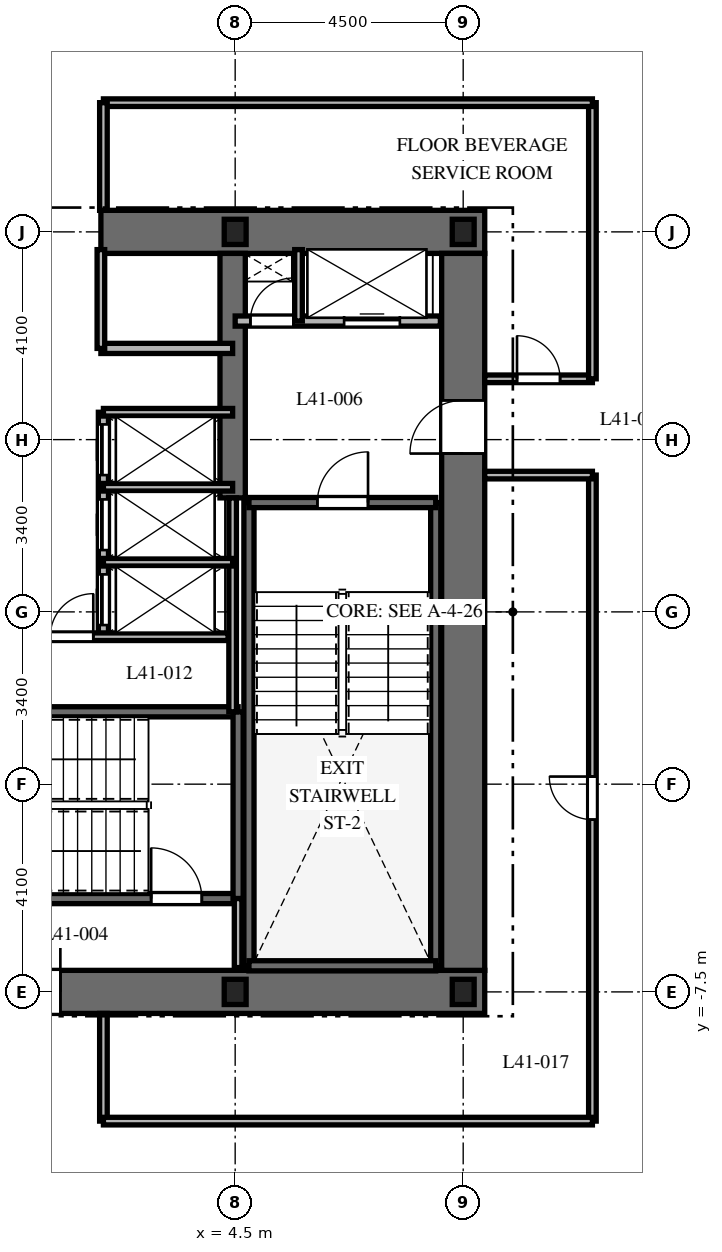
"""IFC4 building model, lengths in metres.
Left out: names, types, materials, properties, quantities, classifications, styles, units other than length and angle.
Written with IfcOpenShell. Run it as: python <this file> out.ifc"""

import sys

from ifc_helpers import new_model, si_unit, direction, frame, frame_2d, origin, origin_2d, place, context, subcontext, project, spatial, rectangle, i_section, extrude, element, fill, save


model = new_model("IFC4")
c1 = context("Model", 3, precision=1e-05, world=origin(), true_north=direction((0.0, 1.0)))
c2 = subcontext(c1, "Body", "Model", "MODEL_VIEW")
j1 = project(units=[si_unit("LENGTHUNIT", "METRE"), si_unit("PLANEANGLEUNIT", "RADIAN")], contexts=[c1])
p1 = place(None, origin())
s1 = spatial("IfcSite", under=j1, at=p1, CompositionType="ELEMENT")
p2 = place(p1, origin())
s2 = spatial("IfcBuilding", under=s1, at=p2, CompositionType="ELEMENT")
p3 = place(p2, frame((0.0, 0.0, 166.5)))
s3 = spatial("IfcBuildingStorey", under=s2, at=p3, CompositionType="ELEMENT", Elevation=166.5)
p4 = place(p3, frame((-9.425, -7.5, 0.0), z_axis=(0.0, 0.0, 1.0), x_axis=(1.0, 0.0, 0.0)))
e1 = element("IfcWall", 1, at=p4, inside=s3, PredefinedType="SHEAR", context=c2, shape_type="SweptSolid", body=[
    extrude(rectangle(XDim=18.85, YDim=0.85, at=frame_2d((9.425, 0.0))), origin(), (0.0, 0.0, 1.0), 3.7),
])
p5 = place(p4, frame((9.475, 0.0, 0.0)))
e2 = element("IfcOpeningElement", 2, at=p5, cuts=e1, PredefinedType="OPENING", context=c2, shape_type="SweptSolid", body=[
    extrude(rectangle(XDim=1.0, YDim=2.15, at=frame_2d((0.5, 1.075))), frame((0.0, 0.435, 0.0), z_axis=(0.0, -1.0, 0.0), x_axis=(1.0, 0.0, 0.0)), (0.0, 0.0, 1.0), 0.87),
])
p6 = place(p3, frame((1.85, 7.5, 0.0), z_axis=(0.0, 0.0, 1.0), x_axis=(1.0, 0.0, 0.0)))
e3 = element("IfcWall", 3, at=p6, inside=s3, PredefinedType="SHEAR", context=c2, shape_type="SweptSolid", body=[
    extrude(rectangle(XDim=7.575, YDim=0.85, at=frame_2d((3.788, 0.0))), origin(), (0.0, 0.0, 1.0), 3.7),
])
p7 = place(p3, frame((9.0, -7.075, 0.0), z_axis=(0.0, 0.0, 1.0), x_axis=(0.0, 1.0, 0.0)))
e4 = element("IfcWall", 4, at=p7, inside=s3, PredefinedType="SHEAR", context=c2, shape_type="SweptSolid", body=[
    extrude(rectangle(XDim=14.15, YDim=0.85, at=frame_2d((7.075, 0.0))), origin(), (0.0, 0.0, 1.0), 3.7),
])
p8 = place(p7, frame((10.2, 0.0, 0.0)))
e5 = element("IfcOpeningElement", 5, at=p8, cuts=e4, PredefinedType="OPENING", context=c2, shape_type="SweptSolid", body=[
    extrude(rectangle(XDim=1.05, YDim=2.15, at=frame_2d((0.525, 1.075))), frame((0.0, 0.435, 0.0), z_axis=(0.0, -1.0, 0.0), x_axis=(1.0, 0.0, 0.0)), (0.0, 0.0, 1.0), 0.87),
])
p9 = place(p3, frame((4.45, 2.25, 0.0), z_axis=(0.0, 0.0, 1.0), x_axis=(0.0, 1.0, 0.0)))
e6 = element("IfcWall", 6, at=p9, inside=s3, PredefinedType="SHEAR", context=c2, shape_type="SweptSolid", body=[
    extrude(rectangle(XDim=4.825, YDim=0.5, at=frame_2d((2.413, 0.0))), origin(), (0.0, 0.0, 1.0), 3.7),
])
for number, where, z_axis, x_axis in (
    (7, (4.772, -6.985, 0.0), (0.0, 0.0, 1.0), (0.0, 1.0, 0.0)),
    (8, (8.458, -6.985, 0.0), (0.0, 0.0, 1.0), (0.0, 1.0, 0.0)),
):
    element("IfcWall", number, at=place(p3, frame(where, z_axis=z_axis, x_axis=x_axis)), inside=s3, PredefinedType="SHEAR", context=c2, shape_type="SweptSolid", body=[
        extrude(rectangle(XDim=9.143, YDim=0.2, at=frame_2d((4.572, 0.0))), origin(), (0.0, 0.0, 1.0), 3.7),
    ])
p10 = place(p3, frame((4.772, -6.985, 0.0), z_axis=(0.0, 0.0, 1.0), x_axis=(1.0, 0.0, 0.0)))
e9 = element("IfcWall", 9, at=p10, inside=s3, PredefinedType="SHEAR", context=c2, shape_type="SweptSolid", body=[
    extrude(rectangle(XDim=3.686, YDim=0.2, at=frame_2d((1.843, 0.0))), origin(), (0.0, 0.0, 1.0), 3.7),
])
p11 = place(p3, frame((4.772, 2.158, 0.0), z_axis=(0.0, 0.0, 1.0), x_axis=(1.0, 0.0, 0.0)))
e10 = element("IfcWall", 10, at=p11, inside=s3, PredefinedType="SHEAR", context=c2, shape_type="SweptSolid", body=[
    extrude(rectangle(XDim=3.686, YDim=0.2, at=frame_2d((1.843, 0.0))), origin(), (0.0, 0.0, 1.0), 3.7),
])
p12 = place(p11, frame((1.35, 0.0, 0.0)))
e11 = element("IfcOpeningElement", 11, at=p12, cuts=e10, PredefinedType="OPENING", context=c2, shape_type="SweptSolid", body=[
    extrude(rectangle(XDim=1.0, YDim=2.15, at=frame_2d((0.5, 1.075))), frame((0.0, 0.11, 0.0), z_axis=(0.0, -1.0, 0.0), x_axis=(1.0, 0.0, 0.0)), (0.0, 0.0, 1.0), 0.22),
])
p13 = place(p3, frame((-4.608, -5.658, 0.0), z_axis=(0.0, 0.0, 1.0), x_axis=(1.0, 0.0, 0.0)))
e12 = element("IfcWall", 12, at=p13, inside=s3, PredefinedType="SHEAR", context=c2, shape_type="SweptSolid", body=[
    extrude(rectangle(XDim=9.166, YDim=0.2, at=frame_2d((4.583, 0.0))), origin(), (0.0, 0.0, 1.0), 3.7),
])
p14 = place(p13, frame((7.45, 0.0, 0.0)))
e13 = element("IfcOpeningElement", 13, at=p14, cuts=e12, PredefinedType="OPENING", context=c2, shape_type="SweptSolid", body=[
    extrude(rectangle(XDim=1.0, YDim=2.15, at=frame_2d((0.5, 1.075))), frame((0.0, 0.11, 0.0), z_axis=(0.0, -1.0, 0.0), x_axis=(1.0, 0.0, 0.0)), (0.0, 0.0, 1.0), 0.22),
])
p15 = place(p3, frame((-4.608, -1.972, 0.0), z_axis=(0.0, 0.0, 1.0), x_axis=(1.0, 0.0, 0.0)))
e14 = element("IfcWall", 14, at=p15, inside=s3, PredefinedType="SHEAR", context=c2, shape_type="SweptSolid", body=[
    extrude(rectangle(XDim=9.166, YDim=0.2, at=frame_2d((4.583, 0.0))), origin(), (0.0, 0.0, 1.0), 3.7),
])
p16 = place(p3, frame((4.558, -5.658, 0.0), z_axis=(0.0, 0.0, 1.0), x_axis=(0.0, 1.0, 0.0)))
e15 = element("IfcWall", 15, at=p16, inside=s3, PredefinedType="SHEAR", context=c2, shape_type="SweptSolid", body=[
    extrude(rectangle(XDim=3.686, YDim=0.2, at=frame_2d((1.843, 0.0))), origin(), (0.0, 0.0, 1.0), 3.7),
])
for number, where, z_axis, x_axis in (
    (16, (4.5, -7.5, 0.0), (0.0, 0.0, 1.0), (1.0, 0.0, 0.0)),
    (17, (9.0, -7.5, 0.0), (0.0, 0.0, 1.0), (1.0, 0.0, 0.0)),
    (18, (9.0, 7.5, 0.0), (0.0, 0.0, 1.0), (1.0, 0.0, 0.0)),
    (19, (4.5, 7.5, 0.0), (0.0, 0.0, 1.0), (1.0, 0.0, 0.0)),
):
    element("IfcColumn", number, at=place(p3, frame(where, z_axis=z_axis, x_axis=x_axis)), inside=s3, PredefinedType="COLUMN", context=c2, shape_type="SweptSolid", body=[
        extrude(i_section(OverallWidth=0.432, OverallDepth=0.498, WebThickness=0.056, FlangeThickness=0.089, at=origin_2d()), origin(), (0.0, 0.0, 1.0), 3.7),
    ])
p17 = place(p3, frame((4.558, -7.02, 0.0), z_axis=(0.0, 0.0, 1.0), x_axis=(0.0, 1.0, 0.0)))
e20 = element("IfcWall", 20, at=p17, inside=s3, PredefinedType="PARTITIONING", context=c2, shape_type="SweptSolid", body=[
    extrude(rectangle(XDim=1.362, YDim=0.15, at=frame_2d((0.681, 0.0))), origin(), (0.0, 0.0, 1.0), 3.38),
])
p18 = place(p3, frame((4.5, 5.74, 0.0), z_axis=(0.0, 0.0, 1.0), x_axis=(1.0, 0.0, 0.0)))
e21 = element("IfcWall", 21, at=p18, inside=s3, PredefinedType="PARTITIONING", context=c2, shape_type="SweptSolid", body=[
    extrude(rectangle(XDim=4.05, YDim=0.2, at=frame_2d((2.025, 0.0))), origin(), (0.0, 0.0, 1.0), 3.38),
])
p19 = place(p18, frame((0.3, 0.0, 0.0)))
e22 = element("IfcOpeningElement", 22, at=p19, cuts=e21, PredefinedType="OPENING", context=c2, shape_type="SweptSolid", body=[
    extrude(rectangle(XDim=0.85, YDim=2.03, at=frame_2d((0.425, 1.015))), frame((0.0, 0.11, 0.0), z_axis=(0.0, -1.0, 0.0), x_axis=(1.0, 0.0, 0.0)), (0.0, 0.0, 1.0), 0.22),
])
p20 = place(p18, frame((2.15, 0.0, 0.0)))
e23 = element("IfcOpeningElement", 23, at=p20, cuts=e21, PredefinedType="OPENING", context=c2, shape_type="SweptSolid", body=[
    extrude(rectangle(XDim=1.1, YDim=2.2, at=frame_2d((0.55, 1.1))), frame((0.0, 0.11, 0.0), z_axis=(0.0, -1.0, 0.0), x_axis=(1.0, 0.0, 0.0)), (0.0, 0.0, 1.0), 0.22),
])
p21 = place(p3, frame((5.75, 5.74, 0.0), z_axis=(0.0, 0.0, 1.0), x_axis=(0.0, 1.0, 0.0)))
e24 = element("IfcWall", 24, at=p21, inside=s3, PredefinedType="PARTITIONING", context=c2, shape_type="SweptSolid", body=[
    extrude(rectangle(XDim=1.41, YDim=0.15, at=frame_2d((0.705, 0.0))), origin(), (0.0, 0.0, 1.0), 3.38),
])
p22 = place(p3, frame((1.85, 5.2, 0.0), z_axis=(0.0, 0.0, 1.0), x_axis=(1.0, 0.0, 0.0)))
e25 = element("IfcWall", 25, at=p22, inside=s3, PredefinedType="PARTITIONING", context=c2, shape_type="SweptSolid", body=[
    extrude(rectangle(XDim=2.6, YDim=0.2, at=frame_2d((1.3, 0.0))), origin(), (0.0, 0.0, 1.0), 3.38),
])
p23 = place(p3, frame((1.85, 5.2, 0.0), z_axis=(0.0, 0.0, 1.0), x_axis=(0.0, 1.0, 0.0)))
e26 = element("IfcWall", 26, at=p23, inside=s3, PredefinedType="PARTITIONING", context=c2, shape_type="SweptSolid", body=[
    extrude(rectangle(XDim=1.95, YDim=0.15, at=frame_2d((0.975, 0.0))), origin(), (0.0, 0.0, 1.0), 3.38),
])
p24 = place(p3, frame((4.45, -1.972, 0.0), z_axis=(0.0, 0.0, 1.0), x_axis=(0.0, 1.0, 0.0)))
e27 = element("IfcWall", 27, at=p24, inside=s3, PredefinedType="PARTITIONING", context=c2, shape_type="SweptSolid", body=[
    extrude(rectangle(XDim=4.222, YDim=0.15, at=frame_2d((2.111, 0.0))), origin(), (0.0, 0.0, 1.0), 3.38),
])
p25 = place(p3, frame((1.9, -0.5, 0.0), z_axis=(0.0, 0.0, 1.0), x_axis=(0.0, 1.0, 0.0)))
e28 = element("IfcWall", 28, at=p25, inside=s3, PredefinedType="PARTITIONING", context=c2, shape_type="SweptSolid", body=[
    extrude(rectangle(XDim=4.44, YDim=0.2, at=frame_2d((2.22, 0.0))), origin(), (0.0, 0.0, 1.0), 3.38),
])
p26 = place(p25, frame((0.24, 0.0, 0.0)))
e29 = element("IfcOpeningElement", 29, at=p26, cuts=e28, PredefinedType="OPENING", context=c2, shape_type="SweptSolid", body=[
    extrude(rectangle(XDim=1.0, YDim=2.2, at=frame_2d((0.5, 1.1))), frame((0.0, 0.11, 0.0), z_axis=(0.0, -1.0, 0.0), x_axis=(1.0, 0.0, 0.0)), (0.0, 0.0, 1.0), 0.22),
])
p27 = place(p25, frame((1.72, 0.0, 0.0)))
e30 = element("IfcOpeningElement", 30, at=p27, cuts=e28, PredefinedType="OPENING", context=c2, shape_type="SweptSolid", body=[
    extrude(rectangle(XDim=1.0, YDim=2.2, at=frame_2d((0.5, 1.1))), frame((0.0, 0.11, 0.0), z_axis=(0.0, -1.0, 0.0), x_axis=(1.0, 0.0, 0.0)), (0.0, 0.0, 1.0), 0.22),
])
p28 = place(p25, frame((3.2, 0.0, 0.0)))
e31 = element("IfcOpeningElement", 31, at=p28, cuts=e28, PredefinedType="OPENING", context=c2, shape_type="SweptSolid", body=[
    extrude(rectangle(XDim=1.0, YDim=2.2, at=frame_2d((0.5, 1.1))), frame((0.0, 0.11, 0.0), z_axis=(0.0, -1.0, 0.0), x_axis=(1.0, 0.0, 0.0)), (0.0, 0.0, 1.0), 0.22),
])
for number, where, z_axis, x_axis in (
    (32, (1.9, 3.94, 0.0), (0.0, 0.0, 1.0), (1.0, 0.0, 0.0)),
    (33, (1.9, 0.98, 0.0), (0.0, 0.0, 1.0), (1.0, 0.0, 0.0)),
    (34, (1.9, 2.46, 0.0), (0.0, 0.0, 1.0), (1.0, 0.0, 0.0)),
):
    element("IfcWall", number, at=place(p3, frame(where, z_axis=z_axis, x_axis=x_axis)), inside=s3, PredefinedType="PARTITIONING", context=c2, shape_type="SweptSolid", body=[
        extrude(rectangle(XDim=2.55, YDim=0.15, at=frame_2d((1.275, 0.0))), origin(), (0.0, 0.0, 1.0), 3.38),
    ])
p29 = place(p3, frame((-4.36, -0.49, 0.0), z_axis=(0.0, 0.0, 1.0), x_axis=(1.0, 0.0, 0.0)))
e35 = element("IfcWall", 35, at=p29, inside=s3, PredefinedType="PARTITIONING", context=c2, shape_type="SweptSolid", body=[
    extrude(rectangle(XDim=8.72, YDim=0.15, at=frame_2d((4.36, 0.0))), origin(), (0.0, 0.0, 1.0), 3.38),
])
p30 = place(p29, frame((3.16, 0.0, 0.0)))
e36 = element("IfcOpeningElement", 36, at=p30, cuts=e35, PredefinedType="OPENING", context=c2, shape_type="SweptSolid", body=[
    extrude(rectangle(XDim=0.85, YDim=2.03, at=frame_2d((0.425, 1.015))), frame((0.0, 0.085, 0.0), z_axis=(0.0, -1.0, 0.0), x_axis=(1.0, 0.0, 0.0)), (0.0, 0.0, 1.0), 0.17),
])
p31 = place(p29, frame((5.21, 0.0, 0.0)))
e37 = element("IfcOpeningElement", 37, at=p31, cuts=e35, PredefinedType="OPENING", context=c2, shape_type="SweptSolid", body=[
    extrude(rectangle(XDim=0.85, YDim=2.03, at=frame_2d((0.425, 1.015))), frame((0.0, 0.085, 0.0), z_axis=(0.0, -1.0, 0.0), x_axis=(1.0, 0.0, 0.0)), (0.0, 0.0, 1.0), 0.17),
])
p32 = place(p3, frame((11.55, -10.05, 0.0), z_axis=(0.0, 0.0, 1.0), x_axis=(0.0, 1.0, 0.0)))
e38 = element("IfcWall", 38, at=p32, inside=s3, PredefinedType="PARTITIONING", context=c2, shape_type="SweptSolid", body=[
    extrude(rectangle(XDim=12.75, YDim=0.15, at=frame_2d((6.375, 0.0))), origin(), (0.0, 0.0, 1.0), 2.82),
])
p33 = place(p32, frame((5.95, 0.0, 0.0)))
e39 = element("IfcOpeningElement", 39, at=p33, cuts=e38, PredefinedType="OPENING", context=c2, shape_type="SweptSolid", body=[
    extrude(rectangle(XDim=0.85, YDim=2.03, at=frame_2d((0.425, 1.015))), frame((0.0, 0.085, 0.0), z_axis=(0.0, -1.0, 0.0), x_axis=(1.0, 0.0, 0.0)), (0.0, 0.0, 1.0), 0.17),
])
p34 = place(p3, frame((11.55, 2.7, 0.0), z_axis=(0.0, 0.0, 1.0), x_axis=(-1.0, 0.0, 0.0)))
e40 = element("IfcWall", 40, at=p34, inside=s3, PredefinedType="PARTITIONING", context=c2, shape_type="SweptSolid", body=[
    extrude(rectangle(XDim=2.125, YDim=0.15, at=frame_2d((1.062, 0.0))), origin(), (0.0, 0.0, 1.0), 3.38),
])
p35 = place(p3, frame((9.425, 4.6, 0.0), z_axis=(0.0, 0.0, 1.0), x_axis=(1.0, 0.0, 0.0)))
e41 = element("IfcWall", 41, at=p35, inside=s3, PredefinedType="PARTITIONING", context=c2, shape_type="SweptSolid", body=[
    extrude(rectangle(XDim=2.125, YDim=0.15, at=frame_2d((1.062, 0.0))), origin(), (0.0, 0.0, 1.0), 3.38),
])
p36 = place(p35, frame((0.637, 0.0, 0.0)))
e42 = element("IfcOpeningElement", 42, at=p36, cuts=e41, PredefinedType="OPENING", context=c2, shape_type="SweptSolid", body=[
    extrude(rectangle(XDim=0.85, YDim=2.03, at=frame_2d((0.425, 1.015))), frame((0.0, 0.085, 0.0), z_axis=(0.0, -1.0, 0.0), x_axis=(1.0, 0.0, 0.0)), (0.0, 0.0, 1.0), 0.17),
])
p37 = place(p3, frame((11.55, 4.6, 0.0), z_axis=(0.0, 0.0, 1.0), x_axis=(0.0, 1.0, 0.0)))
e43 = element("IfcWall", 43, at=p37, inside=s3, PredefinedType="PARTITIONING", context=c2, shape_type="SweptSolid", body=[
    extrude(rectangle(XDim=5.45, YDim=0.15, at=frame_2d((2.725, 0.0))), origin(), (0.0, 0.0, 1.0), 2.82),
])
p38 = place(p3, frame((11.55, 10.05, 0.0), z_axis=(0.0, 0.0, 1.0), x_axis=(-1.0, 0.0, 0.0)))
e44 = element("IfcWall", 44, at=p38, inside=s3, PredefinedType="PARTITIONING", context=c2, shape_type="SweptSolid", body=[
    extrude(rectangle(XDim=9.65, YDim=0.15, at=frame_2d((4.825, 0.0))), origin(), (0.0, 0.0, 1.0), 2.82),
])
for number, where, z_axis, x_axis in (
    (45, (1.9, 10.05, 0.0), (0.0, 0.0, 1.0), (0.0, -1.0, 0.0)),
    (46, (1.9, -7.925, 0.0), (0.0, 0.0, 1.0), (0.0, -1.0, 0.0)),
):
    element("IfcWall", number, at=place(p3, frame(where, z_axis=z_axis, x_axis=x_axis)), inside=s3, PredefinedType="PARTITIONING", context=c2, shape_type="SweptSolid", body=[
        extrude(rectangle(XDim=2.125, YDim=0.15, at=frame_2d((1.062, 0.0))), origin(), (0.0, 0.0, 1.0), 3.38),
    ])
p39 = place(p3, frame((1.9, -10.05, 0.0), z_axis=(0.0, 0.0, 1.0), x_axis=(1.0, 0.0, 0.0)))
e47 = element("IfcWall", 47, at=p39, inside=s3, PredefinedType="PARTITIONING", context=c2, shape_type="SweptSolid", body=[
    extrude(rectangle(XDim=9.65, YDim=0.15, at=frame_2d((4.825, 0.0))), origin(), (0.0, 0.0, 1.0), 2.82),
])
p40 = place(p12, origin())
e48 = element("IfcDoor", 48, at=p40, inside=s3, OperationType="SINGLE_SWING_RIGHT", PredefinedType="DOOR", context=c2, shape_type="SweptSolid", body=[
    extrude(rectangle(XDim=1.0, YDim=2.15, at=frame_2d((0.5, 1.075))), frame((0.0, 0.025, 0.0), z_axis=(0.0, -1.0, 0.0), x_axis=(1.0, 0.0, 0.0)), (0.0, 0.0, 1.0), 0.05),
])
fill(e11, e48)
p41 = place(p14, origin())
e49 = element("IfcDoor", 49, at=p41, inside=s3, OperationType="SINGLE_SWING_LEFT", PredefinedType="DOOR", context=c2, shape_type="SweptSolid", body=[
    extrude(rectangle(XDim=1.0, YDim=2.15, at=frame_2d((0.5, 1.075))), frame((0.0, 0.025, 0.0), z_axis=(0.0, -1.0, 0.0), x_axis=(1.0, 0.0, 0.0)), (0.0, 0.0, 1.0), 0.05),
])
fill(e13, e49)
p42 = place(p5, origin())
e50 = element("IfcDoor", 50, at=p42, inside=s3, OperationType="SINGLE_SWING_RIGHT", PredefinedType="DOOR", context=c2, shape_type="SweptSolid", body=[
    extrude(rectangle(XDim=1.0, YDim=2.15, at=frame_2d((0.5, 1.075))), frame((0.0, 0.025, 0.0), z_axis=(0.0, -1.0, 0.0), x_axis=(1.0, 0.0, 0.0)), (0.0, 0.0, 1.0), 0.05),
])
fill(e2, e50)
p43 = place(p8, origin())
e51 = element("IfcDoor", 51, at=p43, inside=s3, OperationType="SINGLE_SWING_LEFT", PredefinedType="DOOR", context=c2, shape_type="SweptSolid", body=[
    extrude(rectangle(XDim=1.05, YDim=2.15, at=frame_2d((0.525, 1.075))), frame((0.0, 0.025, 0.0), z_axis=(0.0, -1.0, 0.0), x_axis=(1.0, 0.0, 0.0)), (0.0, 0.0, 1.0), 0.05),
])
fill(e5, e51)
p44 = place(p19, origin())
e52 = element("IfcDoor", 52, at=p44, inside=s3, OperationType="SINGLE_SWING_RIGHT", PredefinedType="DOOR", context=c2, shape_type="SweptSolid", body=[
    extrude(rectangle(XDim=0.85, YDim=2.03, at=frame_2d((0.425, 1.015))), frame((0.0, 0.025, 0.0), z_axis=(0.0, -1.0, 0.0), x_axis=(1.0, 0.0, 0.0)), (0.0, 0.0, 1.0), 0.05),
])
fill(e22, e52)
p45 = place(p20, origin())
e53 = element("IfcDoor", 53, at=p45, inside=s3, OperationType="SLIDING_TO_RIGHT", PredefinedType="DOOR", context=c2, shape_type="SweptSolid", body=[
    extrude(rectangle(XDim=1.1, YDim=2.2, at=frame_2d((0.55, 1.1))), frame((0.0, 0.025, 0.0), z_axis=(0.0, -1.0, 0.0), x_axis=(1.0, 0.0, 0.0)), (0.0, 0.0, 1.0), 0.05),
])
fill(e23, e53)
p46 = place(p26, origin())
e54 = element("IfcDoor", 54, at=p46, inside=s3, OperationType="SLIDING_TO_RIGHT", PredefinedType="DOOR", context=c2, shape_type="SweptSolid", body=[
    extrude(rectangle(XDim=1.0, YDim=2.2, at=frame_2d((0.5, 1.1))), frame((0.0, 0.025, 0.0), z_axis=(0.0, -1.0, 0.0), x_axis=(1.0, 0.0, 0.0)), (0.0, 0.0, 1.0), 0.05),
])
fill(e29, e54)
p47 = place(p27, origin())
e55 = element("IfcDoor", 55, at=p47, inside=s3, OperationType="SLIDING_TO_RIGHT", PredefinedType="DOOR", context=c2, shape_type="SweptSolid", body=[
    extrude(rectangle(XDim=1.0, YDim=2.2, at=frame_2d((0.5, 1.1))), frame((0.0, 0.025, 0.0), z_axis=(0.0, -1.0, 0.0), x_axis=(1.0, 0.0, 0.0)), (0.0, 0.0, 1.0), 0.05),
])
fill(e30, e55)
p48 = place(p28, origin())
e56 = element("IfcDoor", 56, at=p48, inside=s3, OperationType="SLIDING_TO_RIGHT", PredefinedType="DOOR", context=c2, shape_type="SweptSolid", body=[
    extrude(rectangle(XDim=1.0, YDim=2.2, at=frame_2d((0.5, 1.1))), frame((0.0, 0.025, 0.0), z_axis=(0.0, -1.0, 0.0), x_axis=(1.0, 0.0, 0.0)), (0.0, 0.0, 1.0), 0.05),
])
fill(e31, e56)
p49 = place(p31, origin())
e57 = element("IfcDoor", 57, at=p49, inside=s3, OperationType="SINGLE_SWING_RIGHT", PredefinedType="DOOR", context=c2, shape_type="SweptSolid", body=[
    extrude(rectangle(XDim=0.85, YDim=2.03, at=frame_2d((0.425, 1.015))), frame((0.0, 0.025, 0.0), z_axis=(0.0, -1.0, 0.0), x_axis=(1.0, 0.0, 0.0)), (0.0, 0.0, 1.0), 0.05),
])
fill(e37, e57)
p50 = place(p36, origin())
e58 = element("IfcDoor", 58, at=p50, inside=s3, OperationType="SINGLE_SWING_LEFT", PredefinedType="DOOR", context=c2, shape_type="SweptSolid", body=[
    extrude(rectangle(XDim=0.85, YDim=2.03, at=frame_2d((0.425, 1.015))), frame((0.0, 0.025, 0.0), z_axis=(0.0, -1.0, 0.0), x_axis=(1.0, 0.0, 0.0)), (0.0, 0.0, 1.0), 0.05),
])
fill(e42, e58)
p51 = place(p33, origin())
e59 = element("IfcDoor", 59, at=p51, inside=s3, OperationType="SINGLE_SWING_RIGHT", PredefinedType="DOOR", context=c2, shape_type="SweptSolid", body=[
    extrude(rectangle(XDim=0.85, YDim=2.03, at=frame_2d((0.425, 1.015))), frame((0.0, 0.025, 0.0), z_axis=(0.0, -1.0, 0.0), x_axis=(1.0, 0.0, 0.0)), (0.0, 0.0, 1.0), 0.05),
])
fill(e39, e59)
save(model, sys.argv[1])
